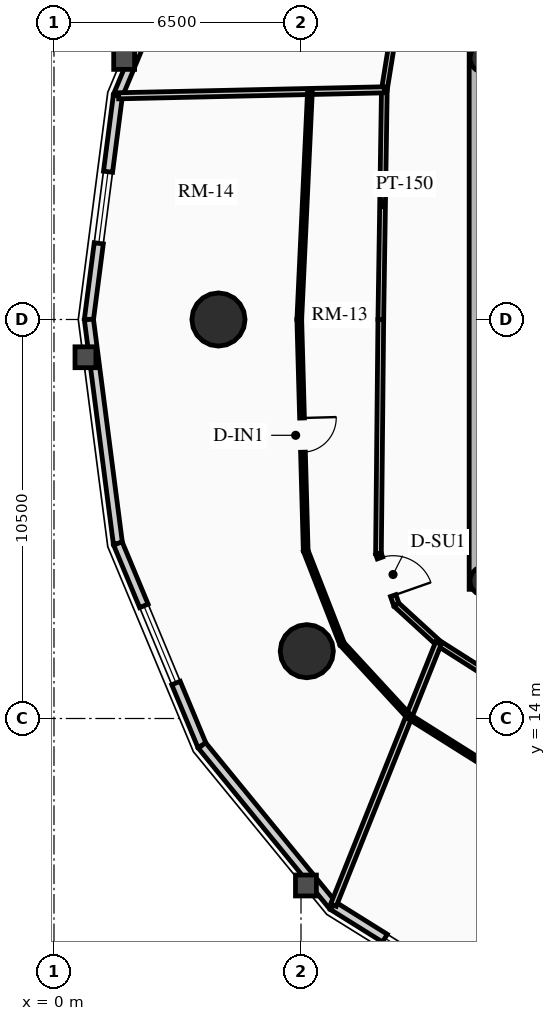
"""IFC4 building model, lengths in metres.
Left out: names, types, materials, properties, quantities, classifications, styles, units other than length and angle.
Written with IfcOpenShell. Run it as: python <this file> out.ifc"""

import sys

from ifc_helpers import new_model, si_unit, direction, frame, frame_2d, origin, origin_2d, place, context, subcontext, project, spatial, rectangle, circle, hollow_circle, extrude, source, transform, mapped, element, fill, save


model = new_model("IFC4")
c1 = context("Model", 3, precision=1e-05, world=origin(), true_north=direction((0.0, 1.0)))
c2 = subcontext(c1, "Body", "Model", "MODEL_VIEW")
j1 = project(units=[si_unit("LENGTHUNIT", "METRE"), si_unit("PLANEANGLEUNIT", "RADIAN")], contexts=[c1])
p1 = place(None, origin())
s1 = spatial("IfcSite", under=j1, at=p1, CompositionType="ELEMENT")
p2 = place(p1, origin())
s2 = spatial("IfcBuilding", under=s1, at=p2, CompositionType="ELEMENT")
p3 = place(p2, frame((0.0, 0.0, 107.98)))
s3 = spatial("IfcBuildingStorey", under=s2, at=p3, CompositionType="ELEMENT", Elevation=107.98)
p4 = place(p3, frame((11.15, 17.4, 0.0), z_axis=(0.0, 0.0, 1.0), x_axis=(0.0, 1.0, 0.0)))
e1 = element("IfcWall", 1, at=p4, inside=s3, PredefinedType="SHEAR", context=c2, shape_type="SweptSolid", body=[
    extrude(rectangle(XDim=14.2, YDim=0.45, at=frame_2d((7.1, 0.0))), origin(), (0.0, 0.0, 1.0), 2.91),
])
for number, where, z_axis, x_axis in (
    (2, (11.325, 17.62, 0.0), (0.0, 0.0, 1.0), (1.0, 0.0, 0.0)),
    (3, (11.325, 31.38, 0.0), (0.0, 0.0, 1.0), (1.0, 0.0, 0.0)),
):
    element("IfcColumn", number, at=place(p3, frame(where, z_axis=z_axis, x_axis=x_axis)), inside=s3, PredefinedType="COLUMN", context=c2, shape_type="SweptSolid", body=[
        extrude(hollow_circle(Radius=0.38, WallThickness=0.032, at=origin_2d()), origin(), (0.0, 0.0, 1.0), 2.91),
    ])
for number, where, z_axis, x_axis in (
    (4, (4.328, 24.5, 0.0), (0.0, 0.0, 1.0), (1.0, 0.0, 0.0)),
    (5, (6.653, 15.771, 0.0), (0.0, 0.0, 1.0), (1.0, 0.0, 0.0)),
):
    element("IfcColumn", number, at=place(p3, frame(where, z_axis=z_axis, x_axis=x_axis)), inside=s3, PredefinedType="USERDEFINED", context=c2, shape_type="SweptSolid", body=[
        extrude(circle(Radius=0.7, at=origin_2d()), origin(), (0.0, 0.0, 1.0), 2.91),
    ])
p5 = place(p3, frame((1.682, 30.393, 0.0), z_axis=(0.0, 0.0, 1.0), x_axis=(0.384344417632, 0.923189779317, 0.0)))
e6 = element("IfcWall", 6, at=p5, inside=s3, PredefinedType="SOLIDWALL", context=c2, shape_type="SweptSolid", body=[
    extrude(rectangle(XDim=5.758, YDim=0.24, at=frame_2d((2.879, 0.0))), origin(), (0.0, 0.0, 1.0), 2.179),
])
p6 = place(p3, frame((0.919, 24.5, 0.0), z_axis=(0.0, 0.0, 1.0), x_axis=(0.128351991996, 0.991728675672, 0.0)))
e7 = element("IfcWall", 7, at=p6, inside=s3, PredefinedType="SOLIDWALL", context=c2, shape_type="SweptSolid", body=[
    extrude(rectangle(XDim=5.942, YDim=0.24, at=frame_2d((2.971, 0.0))), origin(), (0.0, 0.0, 1.0), 2.179),
])
m1 = source(origin(), c2, "Body", "SweptSolid", [
    extrude(rectangle(XDim=1.9, YDim=1.35, at=frame_2d((0.95, 0.675))), frame((0.0, 0.13, 0.0), z_axis=(0.0, -1.0, 0.0), x_axis=(1.0, 0.0, 0.0)), (0.0, 0.0, 1.0), 0.26),
])
p7 = place(p6, frame((2.021, 0.0, 0.65)))
e8 = element("IfcOpeningElement", 8, at=p7, cuts=e7, PredefinedType="OPENING", context=c2, shape_type="MappedRepresentation", body=[
    mapped(m1, transform((0.0, 0.0, 0.0), x_axis=(1.0, 0.0, 0.0), y_axis=(0.0, 1.0, 0.0), z_axis=(0.0, 0.0, 1.0), scale=1.0)),
])
p8 = place(p3, frame((1.682, 18.607, 0.0), z_axis=(0.0, 0.0, 1.0), x_axis=(-0.128351991996, 0.991728675672, 0.0)))
e9 = element("IfcWall", 9, at=p8, inside=s3, PredefinedType="SOLIDWALL", context=c2, shape_type="SweptSolid", body=[
    extrude(rectangle(XDim=5.942, YDim=0.24, at=frame_2d((2.971, 0.0))), origin(), (0.0, 0.0, 1.0), 2.179),
])
p9 = place(p3, frame((3.895, 13.291, 0.0), z_axis=(0.0, 0.0, 1.0), x_axis=(-0.384344417632, 0.923189779317, 0.0)))
e10 = element("IfcWall", 10, at=p9, inside=s3, PredefinedType="SOLIDWALL", context=c2, shape_type="SweptSolid", body=[
    extrude(rectangle(XDim=5.758, YDim=0.24, at=frame_2d((2.879, 0.0))), origin(), (0.0, 0.0, 1.0), 2.179),
])
m2 = source(origin(), c2, "Body", "SweptSolid", [
    extrude(rectangle(XDim=2.2, YDim=1.35, at=frame_2d((1.1, 0.675))), frame((0.0, 0.13, 0.0), z_axis=(0.0, -1.0, 0.0), x_axis=(1.0, 0.0, 0.0)), (0.0, 0.0, 1.0), 0.26),
])
p10 = place(p9, frame((1.779, 0.0, 0.65)))
e11 = element("IfcOpeningElement", 11, at=p10, cuts=e10, PredefinedType="OPENING", context=c2, shape_type="MappedRepresentation", body=[
    mapped(m2, transform((0.0, 0.0, 0.0), x_axis=(1.0, 0.0, 0.0), y_axis=(0.0, 1.0, 0.0), z_axis=(0.0, 0.0, 1.0), scale=1.0)),
])
p11 = place(p3, frame((7.342, 9.072, 0.0), z_axis=(0.0, 0.0, 1.0), x_axis=(-0.632700781152, 0.77439635945, 0.0)))
e12 = element("IfcWall", 12, at=p11, inside=s3, PredefinedType="SOLIDWALL", context=c2, shape_type="SweptSolid", body=[
    extrude(rectangle(XDim=5.448, YDim=0.24, at=frame_2d((2.724, 0.0))), origin(), (0.0, 0.0, 1.0), 2.179),
])
p12 = place(p3, frame((11.685, 6.363, 0.0), z_axis=(0.0, 0.0, 1.0), x_axis=(-0.848520380187, 0.529162701263, 0.0)))
e13 = element("IfcWall", 13, at=p12, inside=s3, PredefinedType="SOLIDWALL", context=c2, shape_type="SweptSolid", body=[
    extrude(rectangle(XDim=5.119, YDim=0.24, at=frame_2d((2.56, 0.0))), origin(), (0.0, 0.0, 1.0), 2.179),
])
p13 = place(p12, frame((1.609, 0.0, 0.65)))
e14 = element("IfcOpeningElement", 14, at=p13, cuts=e13, PredefinedType="OPENING", context=c2, shape_type="MappedRepresentation", body=[
    mapped(m1, transform((0.0, 0.0, 0.0), x_axis=(1.0, 0.0, 0.0), y_axis=(0.0, 1.0, 0.0), z_axis=(0.0, 0.0, 1.0), scale=1.0)),
])
p14 = place(p3, frame((8.94, 32.078, 0.0), z_axis=(0.0, 0.0, 1.0), x_axis=(-0.159148467753, -0.98725466077, 0.0)))
e15 = element("IfcWall", 15, at=p14, inside=s3, PredefinedType="PARTITIONING", context=c2, shape_type="SweptSolid", body=[
    extrude(rectangle(XDim=1.554, YDim=0.15, at=frame_2d((0.777, 0.0))), origin(), (0.0, 0.0, 1.0), 2.225),
])
p15 = place(p3, frame((8.693, 30.544, 0.0), z_axis=(0.0, 0.0, 1.0), x_axis=(-0.015307007986, -0.99988284089, 0.0)))
e16 = element("IfcWall", 16, at=p15, inside=s3, PredefinedType="PARTITIONING", context=c2, shape_type="SweptSolid", body=[
    extrude(rectangle(XDim=6.045, YDim=0.15, at=frame_2d((3.022, 0.0))), origin(), (0.0, 0.0, 1.0), 2.655),
])
p16 = place(p3, frame((8.6, 24.5, 0.0), z_axis=(0.0, 0.0, 1.0), x_axis=(-0.010023665349, -0.999949761805, 0.0)))
e17 = element("IfcWall", 17, at=p16, inside=s3, PredefinedType="PARTITIONING", context=c2, shape_type="SweptSolid", body=[
    extrude(rectangle(XDim=6.162, YDim=0.15, at=frame_2d((3.081, 0.0))), origin(), (0.0, 0.0, 1.0), 2.225),
])
p17 = place(p3, frame((8.538, 18.338, 0.0), z_axis=(0.0, 0.0, 1.0), x_axis=(0.331358150167, -0.94350504838, 0.0)))
e18 = element("IfcWall", 18, at=p17, inside=s3, PredefinedType="PARTITIONING", context=c2, shape_type="SweptSolid", body=[
    extrude(rectangle(XDim=1.424, YDim=0.15, at=frame_2d((0.712, 0.0))), origin(), (0.0, 0.0, 1.0), 2.225),
])
m3 = source(origin(), c2, "Body", "SweptSolid", [
    extrude(rectangle(XDim=1.05, YDim=2.015, at=frame_2d((0.525, 1.007))), frame((0.0, 0.085, 0.0), z_axis=(0.0, -1.0, 0.0), x_axis=(1.0, 0.0, 0.0)), (0.0, 0.0, 1.0), 0.17),
])
p18 = place(p17, frame((0.12, 0.0, 0.0)))
e19 = element("IfcOpeningElement", 19, at=p18, cuts=e18, PredefinedType="OPENING", context=c2, shape_type="MappedRepresentation", body=[
    mapped(m3, transform((0.0, 0.0, 0.0), x_axis=(1.0, 0.0, 0.0), y_axis=(0.0, 1.0, 0.0), z_axis=(0.0, 0.0, 1.0), scale=1.0)),
])
p19 = place(p3, frame((9.01, 16.994, 0.0), z_axis=(0.0, 0.0, 1.0), x_axis=(0.737701798986, -0.67512669609, 0.0)))
e20 = element("IfcWall", 20, at=p19, inside=s3, PredefinedType="PARTITIONING", context=c2, shape_type="SweptSolid", body=[
    extrude(rectangle(XDim=1.498, YDim=0.15, at=frame_2d((0.749, 0.0))), origin(), (0.0, 0.0, 1.0), 2.225),
])
p20 = place(p3, frame((10.115, 15.983, 0.0), z_axis=(0.0, 0.0, 1.0), x_axis=(0.843995849351, -0.536349705209, 0.0)))
e21 = element("IfcWall", 21, at=p20, inside=s3, PredefinedType="PARTITIONING", context=c2, shape_type="SweptSolid", body=[
    extrude(rectangle(XDim=1.593, YDim=0.15, at=frame_2d((0.796, 0.0))), origin(), (0.0, 0.0, 1.0), 2.225),
])
p21 = place(p3, frame((8.693, 30.544, 0.0), z_axis=(0.0, 0.0, 1.0), x_axis=(-0.999746482141, -0.022516026432, 0.0)))
e22 = element("IfcWall", 22, at=p21, inside=s3, PredefinedType="PARTITIONING", context=c2, shape_type="SweptSolid", body=[
    extrude(rectangle(XDim=6.994, YDim=0.16, at=frame_2d((3.497, 0.0))), origin(), (0.0, 0.0, 1.0), 2.179),
])
p22 = place(p3, frame((10.115, 15.983, 0.0), z_axis=(0.0, 0.0, 1.0), x_axis=(-0.371861013147, -0.928288417951, 0.0)))
e23 = element("IfcWall", 23, at=p22, inside=s3, PredefinedType="PARTITIONING", context=c2, shape_type="SweptSolid", body=[
    extrude(rectangle(XDim=7.427, YDim=0.16, at=frame_2d((3.714, 0.0))), origin(), (0.0, 0.0, 1.0), 2.179),
])
p23 = place(p3, frame((6.735, 30.5, 0.0), z_axis=(0.0, 0.0, 1.0), x_axis=(-0.046620801603, -0.998912659274, 0.0)))
e24 = element("IfcWall", 24, at=p23, inside=s3, PredefinedType="PARTITIONING", context=c2, shape_type="SweptSolid", body=[
    extrude(rectangle(XDim=6.007, YDim=0.125, at=frame_2d((3.003, 0.0))), origin(), (0.0, 0.0, 1.0), 2.655),
])
p24 = place(p3, frame((6.455, 24.5, 0.0), z_axis=(0.0, 0.0, 1.0), x_axis=(0.027753708707, -0.999614791634, 0.0)))
e25 = element("IfcWall", 25, at=p24, inside=s3, PredefinedType="PARTITIONING", context=c2, shape_type="SweptSolid", body=[
    extrude(rectangle(XDim=6.087, YDim=0.125, at=frame_2d((3.044, 0.0))), origin(), (0.0, 0.0, 1.0), 2.225),
])
m4 = source(origin(), c2, "Body", "SweptSolid", [
    extrude(rectangle(XDim=0.9, YDim=2.005, at=frame_2d((0.45, 1.002))), frame((0.0, 0.073, 0.0), z_axis=(0.0, -1.0, 0.0), x_axis=(1.0, 0.0, 0.0)), (0.0, 0.0, 1.0), 0.145),
])
p25 = place(p24, frame((2.594, 0.0, 0.0)))
e26 = element("IfcOpeningElement", 26, at=p25, cuts=e25, PredefinedType="OPENING", context=c2, shape_type="MappedRepresentation", body=[
    mapped(m4, transform((0.0, 0.0, 0.0), x_axis=(1.0, 0.0, 0.0), y_axis=(0.0, 1.0, 0.0), z_axis=(0.0, 0.0, 1.0), scale=1.0)),
])
p26 = place(p3, frame((6.624, 18.415, 0.0), z_axis=(0.0, 0.0, 1.0), x_axis=(0.363854295337, -0.931455877519, 0.0)))
e27 = element("IfcWall", 27, at=p26, inside=s3, PredefinedType="PARTITIONING", context=c2, shape_type="SweptSolid", body=[
    extrude(rectangle(XDim=2.635, YDim=0.125, at=frame_2d((1.317, 0.0))), origin(), (0.0, 0.0, 1.0), 2.225),
])
p27 = place(p3, frame((7.583, 15.961, 0.0), z_axis=(0.0, 0.0, 1.0), x_axis=(0.677838563189, -0.735210774032, 0.0)))
e28 = element("IfcWall", 28, at=p27, inside=s3, PredefinedType="PARTITIONING", context=c2, shape_type="SweptSolid", body=[
    extrude(rectangle(XDim=2.596, YDim=0.125, at=frame_2d((1.298, 0.0))), origin(), (0.0, 0.0, 1.0), 2.655),
])
p28 = place(p3, frame((9.342, 14.052, 0.0), z_axis=(0.0, 0.0, 1.0), x_axis=(0.846526826244, -0.532346064557, 0.0)))
e29 = element("IfcWall", 29, at=p28, inside=s3, PredefinedType="PARTITIONING", context=c2, shape_type="SweptSolid", body=[
    extrude(rectangle(XDim=2.578, YDim=0.125, at=frame_2d((1.289, 0.0))), origin(), (0.0, 0.0, 1.0), 2.225),
])
m5 = source(origin(), c2, "Body", "SweptSolid", [
    extrude(rectangle(XDim=1.9, YDim=1.35, at=frame_2d((0.95, 0.675))), frame((0.0, 0.03, 0.0), z_axis=(0.0, -1.0, 0.0), x_axis=(1.0, 0.0, 0.0)), (0.0, 0.0, 1.0), 0.06),
])
p29 = place(p7, origin())
e30 = element("IfcWindow", 30, at=p29, inside=s3, PartitioningType="DOUBLE_PANEL_VERTICAL", PredefinedType="WINDOW", context=c2, shape_type="MappedRepresentation", body=[
    mapped(m5, transform((0.0, 0.0, 0.0), x_axis=(1.0, 0.0, 0.0), y_axis=(0.0, 1.0, 0.0), z_axis=(0.0, 0.0, 1.0), scale=1.0)),
])
fill(e8, e30)
m6 = source(origin(), c2, "Body", "SweptSolid", [
    extrude(rectangle(XDim=2.2, YDim=1.35, at=frame_2d((1.1, 0.675))), frame((0.0, 0.03, 0.0), z_axis=(0.0, -1.0, 0.0), x_axis=(1.0, 0.0, 0.0)), (0.0, 0.0, 1.0), 0.06),
])
p30 = place(p10, origin())
e31 = element("IfcWindow", 31, at=p30, inside=s3, PartitioningType="DOUBLE_PANEL_VERTICAL", PredefinedType="WINDOW", context=c2, shape_type="MappedRepresentation", body=[
    mapped(m6, transform((0.0, 0.0, 0.0), x_axis=(1.0, 0.0, 0.0), y_axis=(0.0, 1.0, 0.0), z_axis=(0.0, 0.0, 1.0), scale=1.0)),
])
fill(e11, e31)
p31 = place(p13, origin())
e32 = element("IfcWindow", 32, at=p31, inside=s3, PartitioningType="DOUBLE_PANEL_VERTICAL", PredefinedType="WINDOW", context=c2, shape_type="MappedRepresentation", body=[
    mapped(m5, transform((0.0, 0.0, 0.0), x_axis=(1.0, 0.0, 0.0), y_axis=(0.0, 1.0, 0.0), z_axis=(0.0, 0.0, 1.0), scale=1.0)),
])
fill(e14, e32)
m7 = source(origin(), c2, "Body", "SweptSolid", [
    extrude(rectangle(XDim=1.05, YDim=2.015, at=frame_2d((0.525, 1.007))), frame((0.0, 0.025, 0.0), z_axis=(0.0, -1.0, 0.0), x_axis=(1.0, 0.0, 0.0)), (0.0, 0.0, 1.0), 0.05),
])
p32 = place(p18, origin())
e33 = element("IfcDoor", 33, at=p32, inside=s3, OperationType="SINGLE_SWING_RIGHT", PredefinedType="DOOR", context=c2, shape_type="MappedRepresentation", body=[
    mapped(m7, transform((0.0, 0.0, 0.0), x_axis=(1.0, 0.0, 0.0), y_axis=(0.0, 1.0, 0.0), z_axis=(0.0, 0.0, 1.0), scale=1.0)),
])
fill(e19, e33)
m8 = source(origin(), c2, "Body", "SweptSolid", [
    extrude(rectangle(XDim=0.9, YDim=2.005, at=frame_2d((0.45, 1.002))), frame((0.0, 0.025, 0.0), z_axis=(0.0, -1.0, 0.0), x_axis=(1.0, 0.0, 0.0)), (0.0, 0.0, 1.0), 0.05),
])
p33 = place(p25, origin())
e34 = element("IfcDoor", 34, at=p33, inside=s3, OperationType="SINGLE_SWING_LEFT", PredefinedType="DOOR", context=c2, shape_type="MappedRepresentation", body=[
    mapped(m8, transform((0.0, 0.0, 0.0), x_axis=(1.0, 0.0, 0.0), y_axis=(0.0, 1.0, 0.0), z_axis=(0.0, 0.0, 1.0), scale=1.0)),
])
fill(e26, e34)
save(model, sys.argv[1])
